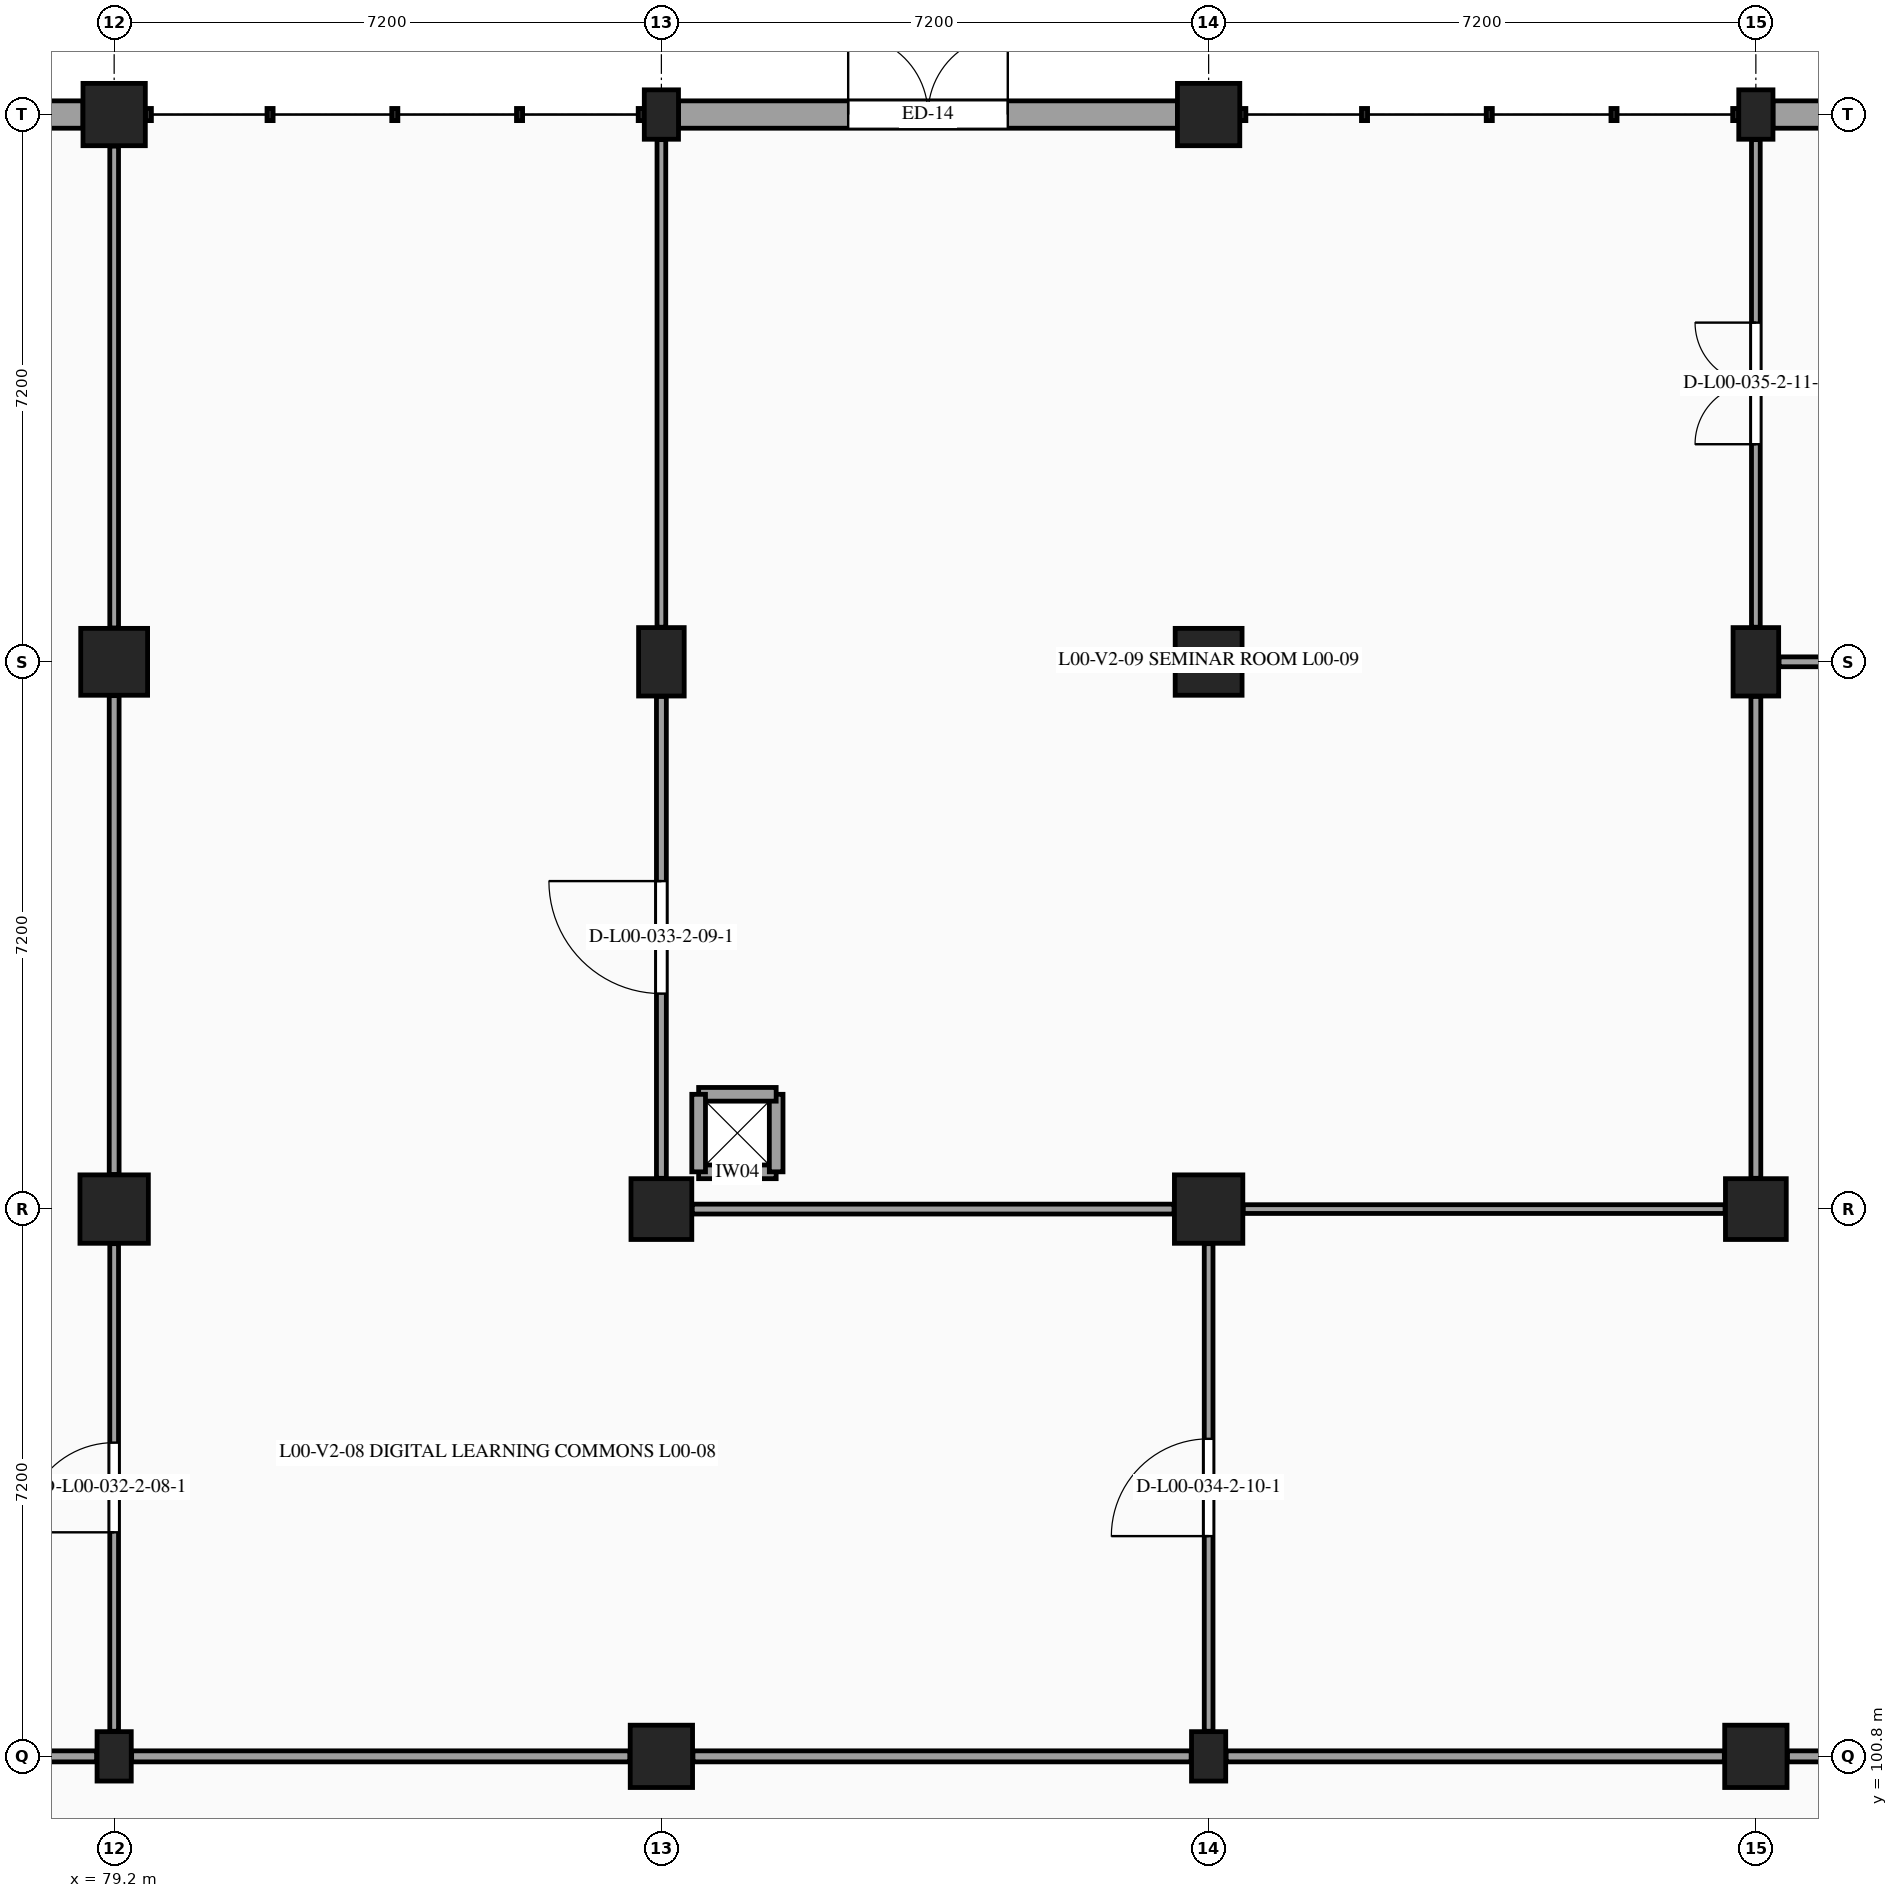
"""IFC4 building model, lengths in metres.
Left out: names, types, materials, properties, quantities, classifications, styles, units other than length and angle.
Written with IfcOpenShell. Run it as: python <this file> out.ifc"""

import sys

from ifc_helpers import new_model, si_unit, direction, frame, frame_2d, origin, origin_2d, place, context, subcontext, project, spatial, rectangle, extrude, element, fill, save


model = new_model("IFC4")
c1 = context("Model", 3, precision=1e-05, world=origin(), true_north=direction((0.0, 1.0)))
c2 = subcontext(c1, "Body", "Model", "MODEL_VIEW")
j1 = project(units=[si_unit("LENGTHUNIT", "METRE"), si_unit("PLANEANGLEUNIT", "RADIAN")], contexts=[c1])
p1 = place(None, origin())
s1 = spatial("IfcSite", under=j1, at=p1, CompositionType="ELEMENT")
p2 = place(p1, origin())
s2 = spatial("IfcBuilding", under=s1, at=p2, CompositionType="ELEMENT")
p3 = place(p2, origin())
s3 = spatial("IfcBuildingStorey", under=s2, at=p3, CompositionType="ELEMENT", Elevation=0.0)
p4 = place(p3, frame((79.2, 100.8, 0.0), z_axis=(0.0, 0.0, 1.0), x_axis=(1.0, 0.0, 0.0)))
e1 = element("IfcColumn", 1, at=p4, inside=s3, PredefinedType="PILASTER", context=c2, shape_type="SweptSolid", body=[
    extrude(rectangle(XDim=0.45, YDim=0.65, at=origin_2d()), origin(), (0.0, 0.0, 1.0), 5.4),
])
p5 = place(p3, frame((79.2, 108.0, 0.0), z_axis=(0.0, 0.0, 1.0), x_axis=(1.0, 0.0, 0.0)))
e2 = element("IfcColumn", 2, at=p5, inside=s3, PredefinedType="COLUMN", context=c2, shape_type="SweptSolid", body=[
    extrude(rectangle(XDim=0.9, YDim=0.9, at=origin_2d()), origin(), (0.0, 0.0, 1.0), 5.4),
])
p6 = place(p3, frame((79.2, 115.2, 0.0), z_axis=(0.0, 0.0, 1.0), x_axis=(1.0, 0.0, 0.0)))
e3 = element("IfcColumn", 3, at=p6, inside=s3, PredefinedType="COLUMN", context=c2, shape_type="SweptSolid", body=[
    extrude(rectangle(XDim=0.88, YDim=0.88, at=origin_2d()), origin(), (0.0, 0.0, 1.0), 5.4),
])
for number, where, z_axis, x_axis in (
    (4, (79.2, 122.4, 0.0), (0.0, 0.0, 1.0), (1.0, 0.0, 0.0)),
    (5, (86.4, 100.8, 0.0), (0.0, 0.0, 1.0), (1.0, 0.0, 0.0)),
):
    element("IfcColumn", number, at=place(p3, frame(where, z_axis=z_axis, x_axis=x_axis)), inside=s3, PredefinedType="COLUMN", context=c2, shape_type="SweptSolid", body=[
        extrude(rectangle(XDim=0.82, YDim=0.82, at=origin_2d()), origin(), (0.0, 0.0, 1.0), 5.4),
    ])
p7 = place(p3, frame((86.4, 108.0, 0.0), z_axis=(0.0, 0.0, 1.0), x_axis=(1.0, 0.0, 0.0)))
e6 = element("IfcColumn", 6, at=p7, inside=s3, PredefinedType="COLUMN", context=c2, shape_type="SweptSolid", body=[
    extrude(rectangle(XDim=0.8, YDim=0.8, at=origin_2d()), origin(), (0.0, 0.0, 1.0), 5.4),
])
p8 = place(p3, frame((86.4, 115.2, 0.0), z_axis=(0.0, 0.0, 1.0), x_axis=(1.0, 0.0, 0.0)))
e7 = element("IfcColumn", 7, at=p8, inside=s3, PredefinedType="COLUMN", context=c2, shape_type="SweptSolid", body=[
    extrude(rectangle(XDim=0.6, YDim=0.9, at=origin_2d()), origin(), (0.0, 0.0, 1.0), 5.4),
])
for number, where, z_axis, x_axis in (
    (8, (86.4, 122.4, 0.0), (0.0, 0.0, 1.0), (1.0, 0.0, 0.0)),
    (9, (93.6, 100.8, 0.0), (0.0, 0.0, 1.0), (1.0, 0.0, 0.0)),
):
    element("IfcColumn", number, at=place(p3, frame(where, z_axis=z_axis, x_axis=x_axis)), inside=s3, PredefinedType="PILASTER", context=c2, shape_type="SweptSolid", body=[
        extrude(rectangle(XDim=0.45, YDim=0.65, at=origin_2d()), origin(), (0.0, 0.0, 1.0), 5.4),
    ])
p9 = place(p3, frame((93.6, 108.0, 0.0), z_axis=(0.0, 0.0, 1.0), x_axis=(1.0, 0.0, 0.0)))
e10 = element("IfcColumn", 10, at=p9, inside=s3, PredefinedType="COLUMN", context=c2, shape_type="SweptSolid", body=[
    extrude(rectangle(XDim=0.9, YDim=0.9, at=origin_2d()), origin(), (0.0, 0.0, 1.0), 5.4),
])
p10 = place(p3, frame((93.6, 115.2, 0.0), z_axis=(0.0, 0.0, 1.0), x_axis=(1.0, 0.0, 0.0)))
e11 = element("IfcColumn", 11, at=p10, inside=s3, PredefinedType="COLUMN", context=c2, shape_type="SweptSolid", body=[
    extrude(rectangle(XDim=0.88, YDim=0.88, at=origin_2d()), origin(), (0.0, 0.0, 1.0), 5.4),
])
for number, where, z_axis, x_axis in (
    (12, (93.6, 122.4, 0.0), (0.0, 0.0, 1.0), (1.0, 0.0, 0.0)),
    (13, (100.8, 100.8, 0.0), (0.0, 0.0, 1.0), (1.0, 0.0, 0.0)),
):
    element("IfcColumn", number, at=place(p3, frame(where, z_axis=z_axis, x_axis=x_axis)), inside=s3, PredefinedType="COLUMN", context=c2, shape_type="SweptSolid", body=[
        extrude(rectangle(XDim=0.82, YDim=0.82, at=origin_2d()), origin(), (0.0, 0.0, 1.0), 5.4),
    ])
p11 = place(p3, frame((100.8, 108.0, 0.0), z_axis=(0.0, 0.0, 1.0), x_axis=(1.0, 0.0, 0.0)))
e14 = element("IfcColumn", 14, at=p11, inside=s3, PredefinedType="COLUMN", context=c2, shape_type="SweptSolid", body=[
    extrude(rectangle(XDim=0.8, YDim=0.8, at=origin_2d()), origin(), (0.0, 0.0, 1.0), 5.4),
])
p12 = place(p3, frame((100.8, 115.2, 0.0), z_axis=(0.0, 0.0, 1.0), x_axis=(1.0, 0.0, 0.0)))
e15 = element("IfcColumn", 15, at=p12, inside=s3, PredefinedType="COLUMN", context=c2, shape_type="SweptSolid", body=[
    extrude(rectangle(XDim=0.6, YDim=0.9, at=origin_2d()), origin(), (0.0, 0.0, 1.0), 5.4),
])
p13 = place(p3, frame((100.8, 122.4, 0.0), z_axis=(0.0, 0.0, 1.0), x_axis=(1.0, 0.0, 0.0)))
e16 = element("IfcColumn", 16, at=p13, inside=s3, PredefinedType="PILASTER", context=c2, shape_type="SweptSolid", body=[
    extrude(rectangle(XDim=0.45, YDim=0.65, at=origin_2d()), origin(), (0.0, 0.0, 1.0), 5.4),
])
p14 = place(p3, frame((72.225, 122.4, 0.0), z_axis=(0.0, 0.0, 1.0), x_axis=(1.0, 0.0, 0.0)))
e17 = element("IfcWall", 17, at=p14, inside=s3, PredefinedType="STANDARD", context=c2, shape_type="SweptSolid", body=[
    extrude(rectangle(XDim=6.565, YDim=0.36, at=frame_2d((3.282, 0.0))), origin(), (0.0, 0.0, 1.0), 4.37),
])
p15 = place(p14, frame((2.232, 0.0, 0.0)))
e18 = element("IfcOpeningElement", 18, at=p15, cuts=e17, PredefinedType="OPENING", context=c2, shape_type="SweptSolid", body=[
    extrude(rectangle(XDim=2.1, YDim=2.4, at=frame_2d((1.05, 1.2))), frame((0.0, 0.19, 0.0), z_axis=(0.0, -1.0, 0.0), x_axis=(1.0, 0.0, 0.0)), (0.0, 0.0, 1.0), 0.38),
])
p16 = place(p3, frame((86.625, 122.4, 0.0), z_axis=(0.0, 0.0, 1.0), x_axis=(1.0, 0.0, 0.0)))
e19 = element("IfcWall", 19, at=p16, inside=s3, PredefinedType="STANDARD", context=c2, shape_type="SweptSolid", body=[
    extrude(rectangle(XDim=6.565, YDim=0.36, at=frame_2d((3.282, 0.0))), origin(), (0.0, 0.0, 1.0), 4.37),
])
p17 = place(p16, frame((2.232, 0.0, 0.0)))
e20 = element("IfcOpeningElement", 20, at=p17, cuts=e19, PredefinedType="OPENING", context=c2, shape_type="SweptSolid", body=[
    extrude(rectangle(XDim=2.1, YDim=2.4, at=frame_2d((1.05, 1.2))), frame((0.0, 0.19, 0.0), z_axis=(0.0, -1.0, 0.0), x_axis=(1.0, 0.0, 0.0)), (0.0, 0.0, 1.0), 0.38),
])
p18 = place(p3, frame((101.025, 122.4, 0.0), z_axis=(0.0, 0.0, 1.0), x_axis=(1.0, 0.0, 0.0)))
e21 = element("IfcWall", 21, at=p18, inside=s3, PredefinedType="STANDARD", context=c2, shape_type="SweptSolid", body=[
    extrude(rectangle(XDim=6.565, YDim=0.36, at=frame_2d((3.283, 0.0))), origin(), (0.0, 0.0, 1.0), 4.37),
])
p19 = place(p18, frame((2.232, 0.0, 0.0)))
e22 = element("IfcOpeningElement", 22, at=p19, cuts=e21, PredefinedType="OPENING", context=c2, shape_type="SweptSolid", body=[
    extrude(rectangle(XDim=2.1, YDim=2.4, at=frame_2d((1.05, 1.2))), frame((0.0, 0.19, 0.0), z_axis=(0.0, -1.0, 0.0), x_axis=(1.0, 0.0, 0.0)), (0.0, 0.0, 1.0), 0.38),
])
for number, where, z_axis, x_axis in (
    (23, (86.89, 108.49, 0.0), (0.0, 0.0, 1.0), (1.0, 0.0, 0.0)),
    (24, (87.91, 108.49, 0.0), (0.0, 0.0, 1.0), (0.0, 1.0, 0.0)),
    (25, (87.91, 109.51, 0.0), (0.0, 0.0, 1.0), (-1.0, 0.0, 0.0)),
    (26, (86.89, 109.51, 0.0), (0.0, 0.0, 1.0), (0.0, -1.0, 0.0)),
):
    element("IfcWall", number, at=place(p3, frame(where, z_axis=z_axis, x_axis=x_axis)), inside=s3, PredefinedType="PARTITIONING", context=c2, shape_type="SweptSolid", body=[
        extrude(rectangle(XDim=1.02, YDim=0.18, at=frame_2d((0.51, 0.0))), origin(), (0.0, 0.0, 1.0), 5.09),
    ])
p20 = place(p3, frame((72.415, 100.8, 0.0), z_axis=(0.0, 0.0, 1.0), x_axis=(1.0, 0.0, 0.0)))
e27 = element("IfcWall", 27, at=p20, inside=s3, PredefinedType="PARTITIONING", context=c2, shape_type="SweptSolid", body=[
    extrude(rectangle(XDim=6.555, YDim=0.145, at=frame_2d((3.277, 0.0))), origin(), (0.0, 0.0, 1.0), 4.31),
])
p21 = place(p3, frame((79.2, 101.13, 0.0), z_axis=(0.0, 0.0, 1.0), x_axis=(0.0, 1.0, 0.0)))
e28 = element("IfcWall", 28, at=p21, inside=s3, PredefinedType="PARTITIONING", context=c2, shape_type="SweptSolid", body=[
    extrude(rectangle(XDim=6.415, YDim=0.115, at=frame_2d((3.208, 0.0))), origin(), (0.0, 0.0, 1.0), 4.455),
])
p22 = place(p21, frame((2.617, 0.0, 0.0)))
e29 = element("IfcOpeningElement", 29, at=p22, cuts=e28, PredefinedType="OPENING", context=c2, shape_type="SweptSolid", body=[
    extrude(rectangle(XDim=1.18, YDim=2.18, at=frame_2d((0.59, 1.09))), frame((0.0, 0.067, 0.0), z_axis=(0.0, -1.0, 0.0), x_axis=(1.0, 0.0, 0.0)), (0.0, 0.0, 1.0), 0.135),
])
p23 = place(p3, frame((79.2, 108.455, 0.0), z_axis=(0.0, 0.0, 1.0), x_axis=(0.0, 1.0, 0.0)))
e30 = element("IfcWall", 30, at=p23, inside=s3, PredefinedType="PARTITIONING", context=c2, shape_type="SweptSolid", body=[
    extrude(rectangle(XDim=6.3, YDim=0.13, at=frame_2d((3.15, 0.0))), origin(), (0.0, 0.0, 1.0), 4.405),
])
p24 = place(p3, frame((79.2, 115.645, 0.0), z_axis=(0.0, 0.0, 1.0), x_axis=(0.0, 1.0, 0.0)))
e31 = element("IfcWall", 31, at=p24, inside=s3, PredefinedType="PARTITIONING", context=c2, shape_type="SweptSolid", body=[
    extrude(rectangle(XDim=6.34, YDim=0.115, at=frame_2d((3.17, 0.0))), origin(), (0.0, 0.0, 1.0), 4.405),
])
p25 = place(p3, frame((79.43, 100.8, 0.0), z_axis=(0.0, 0.0, 1.0), x_axis=(1.0, 0.0, 0.0)))
e32 = element("IfcWall", 32, at=p25, inside=s3, PredefinedType="PARTITIONING", context=c2, shape_type="SweptSolid", body=[
    extrude(rectangle(XDim=6.555, YDim=0.145, at=frame_2d((3.278, 0.0))), origin(), (0.0, 0.0, 1.0), 4.34),
])
p26 = place(p3, frame((86.4, 108.405, 0.0), z_axis=(0.0, 0.0, 1.0), x_axis=(0.0, 1.0, 0.0)))
e33 = element("IfcWall", 33, at=p26, inside=s3, PredefinedType="PARTITIONING", context=c2, shape_type="SweptSolid", body=[
    extrude(rectangle(XDim=6.34, YDim=0.13, at=frame_2d((3.17, 0.0))), origin(), (0.0, 0.0, 1.0), 4.405),
])
p27 = place(p26, frame((2.43, 0.0, 0.0)))
e34 = element("IfcOpeningElement", 34, at=p27, cuts=e33, PredefinedType="OPENING", context=c2, shape_type="SweptSolid", body=[
    extrude(rectangle(XDim=1.48, YDim=2.28, at=frame_2d((0.74, 1.14))), frame((0.0, 0.075, 0.0), z_axis=(0.0, -1.0, 0.0), x_axis=(1.0, 0.0, 0.0)), (0.0, 0.0, 1.0), 0.15),
])
p28 = place(p3, frame((86.4, 115.655, 0.0), z_axis=(0.0, 0.0, 1.0), x_axis=(0.0, 1.0, 0.0)))
e35 = element("IfcWall", 35, at=p28, inside=s3, PredefinedType="PARTITIONING", context=c2, shape_type="SweptSolid", body=[
    extrude(rectangle(XDim=6.415, YDim=0.115, at=frame_2d((3.208, 0.0))), origin(), (0.0, 0.0, 1.0), 4.405),
])
p29 = place(p3, frame((86.815, 100.8, 0.0), z_axis=(0.0, 0.0, 1.0), x_axis=(1.0, 0.0, 0.0)))
e36 = element("IfcWall", 36, at=p29, inside=s3, PredefinedType="PARTITIONING", context=c2, shape_type="SweptSolid", body=[
    extrude(rectangle(XDim=6.555, YDim=0.145, at=frame_2d((3.278, 0.0))), origin(), (0.0, 0.0, 1.0), 4.35),
])
p30 = place(p3, frame((93.6, 101.13, 0.0), z_axis=(0.0, 0.0, 1.0), x_axis=(0.0, 1.0, 0.0)))
e37 = element("IfcWall", 37, at=p30, inside=s3, PredefinedType="PARTITIONING", context=c2, shape_type="SweptSolid", body=[
    extrude(rectangle(XDim=6.415, YDim=0.115, at=frame_2d((3.208, 0.0))), origin(), (0.0, 0.0, 1.0), 4.455),
])
p31 = place(p30, frame((2.567, 0.0, 0.0)))
e38 = element("IfcOpeningElement", 38, at=p31, cuts=e37, PredefinedType="OPENING", context=c2, shape_type="SweptSolid", body=[
    extrude(rectangle(XDim=1.28, YDim=2.24, at=frame_2d((0.64, 1.12))), frame((0.0, 0.067, 0.0), z_axis=(0.0, -1.0, 0.0), x_axis=(1.0, 0.0, 0.0)), (0.0, 0.0, 1.0), 0.135),
])
p32 = place(p3, frame((86.805, 108.0, 0.0), z_axis=(0.0, 0.0, 1.0), x_axis=(1.0, 0.0, 0.0)))
e39 = element("IfcWall", 39, at=p32, inside=s3, PredefinedType="PARTITIONING", context=c2, shape_type="SweptSolid", body=[
    extrude(rectangle(XDim=6.34, YDim=0.13, at=frame_2d((3.17, 0.0))), origin(), (0.0, 0.0, 1.0), 4.35),
])
p33 = place(p3, frame((93.83, 100.8, 0.0), z_axis=(0.0, 0.0, 1.0), x_axis=(1.0, 0.0, 0.0)))
e40 = element("IfcWall", 40, at=p33, inside=s3, PredefinedType="PARTITIONING", context=c2, shape_type="SweptSolid", body=[
    extrude(rectangle(XDim=6.555, YDim=0.145, at=frame_2d((3.277, 0.0))), origin(), (0.0, 0.0, 1.0), 4.365),
])
p34 = place(p3, frame((94.055, 108.0, 0.0), z_axis=(0.0, 0.0, 1.0), x_axis=(1.0, 0.0, 0.0)))
e41 = element("IfcWall", 41, at=p34, inside=s3, PredefinedType="PARTITIONING", context=c2, shape_type="SweptSolid", body=[
    extrude(rectangle(XDim=6.34, YDim=0.115, at=frame_2d((3.17, 0.0))), origin(), (0.0, 0.0, 1.0), 4.365),
])
p35 = place(p3, frame((100.8, 108.405, 0.0), z_axis=(0.0, 0.0, 1.0), x_axis=(0.0, 1.0, 0.0)))
e42 = element("IfcWall", 42, at=p35, inside=s3, PredefinedType="PARTITIONING", context=c2, shape_type="SweptSolid", body=[
    extrude(rectangle(XDim=6.34, YDim=0.13, at=frame_2d((3.17, 0.0))), origin(), (0.0, 0.0, 1.0), 4.405),
])
p36 = place(p3, frame((100.8, 115.655, 0.0), z_axis=(0.0, 0.0, 1.0), x_axis=(0.0, 1.0, 0.0)))
e43 = element("IfcWall", 43, at=p36, inside=s3, PredefinedType="PARTITIONING", context=c2, shape_type="SweptSolid", body=[
    extrude(rectangle(XDim=6.415, YDim=0.115, at=frame_2d((3.208, 0.0))), origin(), (0.0, 0.0, 1.0), 4.405),
])
p37 = place(p36, frame((2.407, 0.0, 0.0)))
e44 = element("IfcOpeningElement", 44, at=p37, cuts=e43, PredefinedType="OPENING", context=c2, shape_type="SweptSolid", body=[
    extrude(rectangle(XDim=1.6, YDim=2.2, at=frame_2d((0.8, 1.1))), frame((0.0, 0.067, 0.0), z_axis=(0.0, -1.0, 0.0), x_axis=(1.0, 0.0, 0.0)), (0.0, 0.0, 1.0), 0.135),
])
p38 = place(p3, frame((101.215, 100.8, 0.0), z_axis=(0.0, 0.0, 1.0), x_axis=(1.0, 0.0, 0.0)))
e45 = element("IfcWall", 45, at=p38, inside=s3, PredefinedType="PARTITIONING", context=c2, shape_type="SweptSolid", body=[
    extrude(rectangle(XDim=6.555, YDim=0.145, at=frame_2d((3.277, 0.0))), origin(), (0.0, 0.0, 1.0), 4.37),
])
p39 = place(p3, frame((101.105, 115.2, 0.0), z_axis=(0.0, 0.0, 1.0), x_axis=(1.0, 0.0, 0.0)))
e46 = element("IfcWall", 46, at=p39, inside=s3, PredefinedType="PARTITIONING", context=c2, shape_type="SweptSolid", body=[
    extrude(rectangle(XDim=6.45, YDim=0.13, at=frame_2d((3.225, 0.0))), origin(), (0.0, 0.0, 1.0), 4.37),
])
p40 = place(p17, origin())
e47 = element("IfcDoor", 47, at=p40, inside=s3, OperationType="DOUBLE_DOOR_SINGLE_SWING", PredefinedType="DOOR", context=c2, shape_type="SweptSolid", body=[
    extrude(rectangle(XDim=2.1, YDim=2.4, at=frame_2d((1.05, 1.2))), frame((0.0, 0.025, 0.0), z_axis=(0.0, -1.0, 0.0), x_axis=(1.0, 0.0, 0.0)), (0.0, 0.0, 1.0), 0.05),
])
fill(e20, e47)
p41 = place(p22, origin())
e48 = element("IfcDoor", 48, at=p41, inside=s3, OperationType="SINGLE_SWING_LEFT", PredefinedType="DOOR", context=c2, shape_type="SweptSolid", body=[
    extrude(rectangle(XDim=1.18, YDim=2.18, at=frame_2d((0.59, 1.09))), frame((0.0, 0.025, 0.0), z_axis=(0.0, -1.0, 0.0), x_axis=(1.0, 0.0, 0.0)), (0.0, 0.0, 1.0), 0.05),
])
fill(e29, e48)
p42 = place(p27, origin())
e49 = element("IfcDoor", 49, at=p42, inside=s3, OperationType="SINGLE_SWING_RIGHT", PredefinedType="DOOR", context=c2, shape_type="SweptSolid", body=[
    extrude(rectangle(XDim=1.48, YDim=2.28, at=frame_2d((0.74, 1.14))), frame((0.0, 0.025, 0.0), z_axis=(0.0, -1.0, 0.0), x_axis=(1.0, 0.0, 0.0)), (0.0, 0.0, 1.0), 0.05),
])
fill(e34, e49)
p43 = place(p31, origin())
e50 = element("IfcDoor", 50, at=p43, inside=s3, OperationType="SINGLE_SWING_LEFT", PredefinedType="DOOR", context=c2, shape_type="SweptSolid", body=[
    extrude(rectangle(XDim=1.28, YDim=2.24, at=frame_2d((0.64, 1.12))), frame((0.0, 0.025, 0.0), z_axis=(0.0, -1.0, 0.0), x_axis=(1.0, 0.0, 0.0)), (0.0, 0.0, 1.0), 0.05),
])
fill(e38, e50)
p44 = place(p37, origin())
e51 = element("IfcDoor", 51, at=p44, inside=s3, OperationType="DOUBLE_DOOR_SINGLE_SWING", PredefinedType="DOOR", context=c2, shape_type="SweptSolid", body=[
    extrude(rectangle(XDim=1.6, YDim=2.2, at=frame_2d((0.8, 1.1))), frame((0.0, 0.025, 0.0), z_axis=(0.0, -1.0, 0.0), x_axis=(1.0, 0.0, 0.0)), (0.0, 0.0, 1.0), 0.05),
])
fill(e44, e51)
save(model, sys.argv[1])
